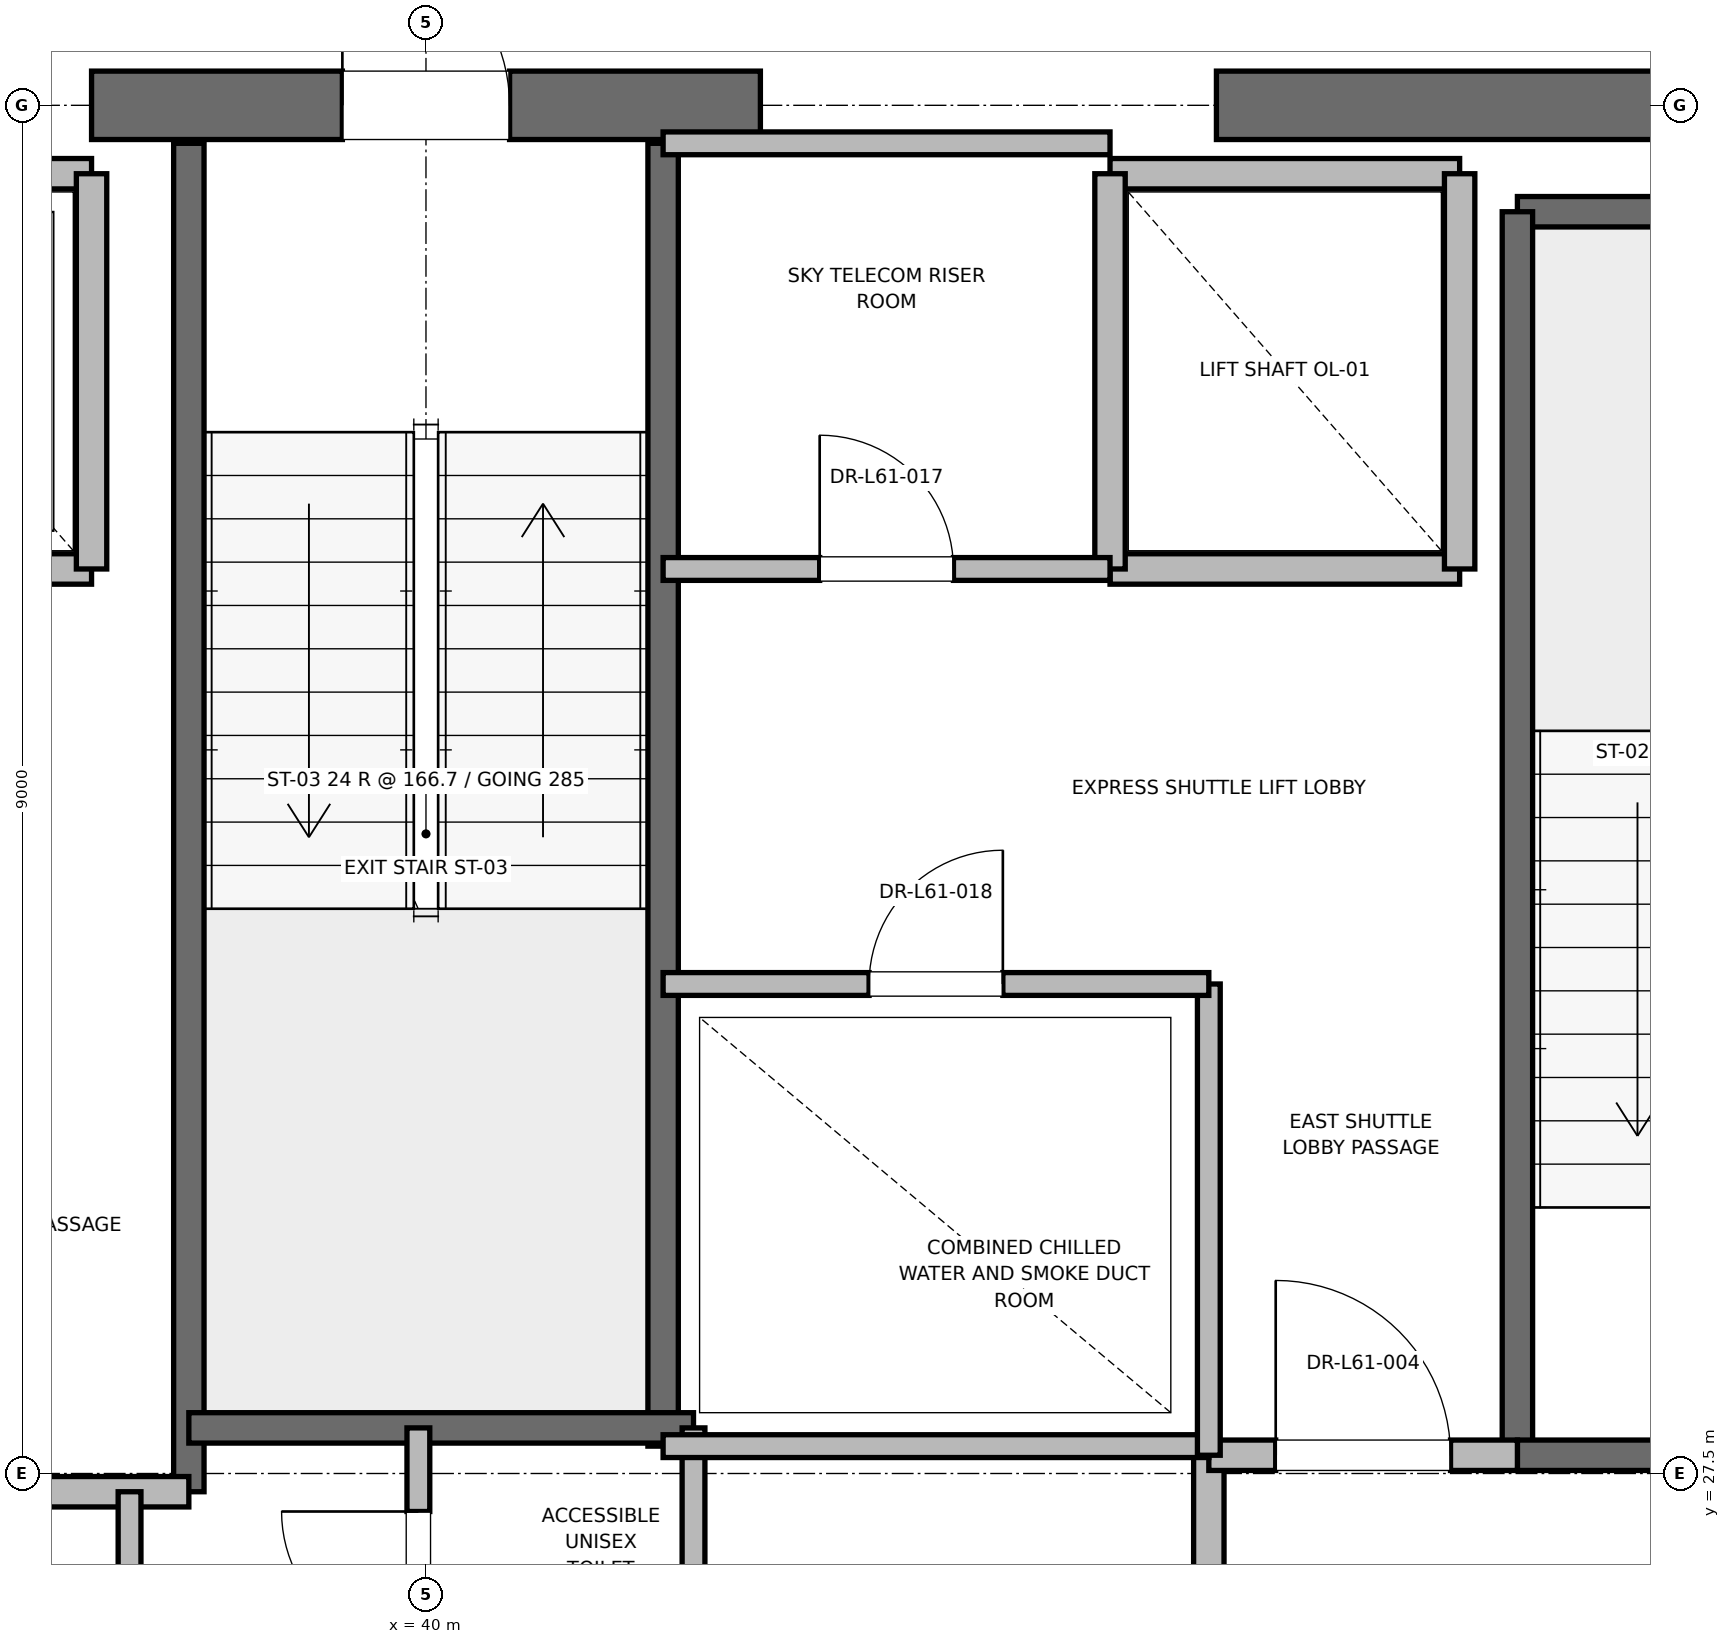
"""IFC4 building model, lengths in metres.
Left out: names, types, materials, properties, quantities, classifications, styles, units other than length and angle.
Written with IfcOpenShell. Run it as: python <this file> out.ifc"""

import sys

from ifc_helpers import new_model, si_unit, direction, frame, frame_2d, origin, place, context, subcontext, project, spatial, rectangle, extrude, element, fill, save


model = new_model("IFC4")
c1 = context("Model", 3, precision=1e-05, world=origin(), true_north=direction((0.0, 1.0)))
c2 = subcontext(c1, "Body", "Model", "MODEL_VIEW")
j1 = project(units=[si_unit("LENGTHUNIT", "METRE"), si_unit("PLANEANGLEUNIT", "RADIAN")], contexts=[c1])
p1 = place(None, origin())
s1 = spatial("IfcSite", under=j1, at=p1, CompositionType="ELEMENT")
p2 = place(p1, origin())
s2 = spatial("IfcBuilding", under=s1, at=p2, CompositionType="ELEMENT")
p3 = place(p2, frame((0.0, 0.0, 263.2)))
s3 = spatial("IfcBuildingStorey", under=s2, at=p3, CompositionType="ELEMENT", Elevation=263.2)
p4 = place(p3, frame((37.8, 36.5, 0.0), z_axis=(0.0, 0.0, 1.0), x_axis=(1.0, 0.0, 0.0)))
e1 = element("IfcWall", 1, at=p4, inside=s3, PredefinedType="SHEAR", context=c2, shape_type="SweptSolid", body=[
    extrude(rectangle(XDim=4.4, YDim=0.45, at=frame_2d((2.2, 0.0))), origin(), (0.0, 0.0, 1.0), 3.785),
])
p5 = place(p4, frame((1.65, 0.0, 0.0)))
e2 = element("IfcOpeningElement", 2, at=p5, cuts=e1, PredefinedType="OPENING", context=c2, shape_type="SweptSolid", body=[
    extrude(rectangle(XDim=1.1, YDim=2.15, at=frame_2d((0.55, 1.075))), frame((0.0, 0.225, 0.0), z_axis=(0.0, -1.0, 0.0), x_axis=(1.0, 0.0, 0.0)), (0.0, 0.0, 1.0), 0.45),
])
p6 = place(p3, frame((45.2, 36.5, 0.0), z_axis=(0.0, 0.0, 1.0), x_axis=(1.0, 0.0, 0.0)))
e3 = element("IfcWall", 3, at=p6, inside=s3, PredefinedType="SHEAR", context=c2, shape_type="SweptSolid", body=[
    extrude(rectangle(XDim=5.8, YDim=0.45, at=frame_2d((2.9, 0.0))), origin(), (0.0, 0.0, 1.0), 3.785),
])
p7 = place(p3, frame((47.18, 35.8, 0.0), z_axis=(0.0, 0.0, 1.0), x_axis=(1.0, 0.0, 0.0)))
e4 = element("IfcWall", 4, at=p7, inside=s3, PredefinedType="SOLIDWALL", context=c2, shape_type="SweptSolid", body=[
    extrude(rectangle(XDim=3.12, YDim=0.2, at=frame_2d((1.56, 0.0))), origin(), (0.0, 0.0, 1.0), 3.785),
])
p8 = place(p3, frame((47.18, 27.62, 0.0), z_axis=(0.0, 0.0, 1.0), x_axis=(0.0, 1.0, 0.0)))
e5 = element("IfcWall", 5, at=p8, inside=s3, PredefinedType="SOLIDWALL", context=c2, shape_type="SweptSolid", body=[
    extrude(rectangle(XDim=8.18, YDim=0.2, at=frame_2d((4.09, 0.0))), origin(), (0.0, 0.0, 1.0), 3.785),
])
p9 = place(p3, frame((47.18, 27.62, 0.0), z_axis=(0.0, 0.0, 1.0), x_axis=(1.0, 0.0, 0.0)))
e6 = element("IfcWall", 6, at=p9, inside=s3, PredefinedType="SOLIDWALL", context=c2, shape_type="SweptSolid", body=[
    extrude(rectangle(XDim=3.12, YDim=0.2, at=frame_2d((1.56, 0.0))), origin(), (0.0, 0.0, 1.0), 3.785),
])
p10 = place(p9, frame((1.01, 0.0, 0.0)))
e7 = element("IfcOpeningElement", 7, at=p10, cuts=e6, PredefinedType="OPENING", context=c2, shape_type="SweptSolid", body=[
    extrude(rectangle(XDim=1.1, YDim=2.15, at=frame_2d((0.55, 1.075))), frame((0.0, 0.1, 0.0), z_axis=(0.0, -1.0, 0.0), x_axis=(1.0, 0.0, 0.0)), (0.0, 0.0, 1.0), 0.2),
])
p11 = place(p3, frame((38.44, 27.38, 0.0), z_axis=(0.0, 0.0, 1.0), x_axis=(0.0, 1.0, 0.0)))
e8 = element("IfcWall", 8, at=p11, inside=s3, PredefinedType="SOLIDWALL", context=c2, shape_type="SweptSolid", body=[
    extrude(rectangle(XDim=8.87, YDim=0.2, at=frame_2d((4.435, 0.0))), origin(), (0.0, 0.0, 1.0), 3.785),
])
p12 = place(p3, frame((41.56, 27.68, 0.0), z_axis=(0.0, 0.0, 1.0), x_axis=(0.0, 1.0, 0.0)))
e9 = element("IfcWall", 9, at=p12, inside=s3, PredefinedType="SOLIDWALL", context=c2, shape_type="SweptSolid", body=[
    extrude(rectangle(XDim=8.57, YDim=0.2, at=frame_2d((4.285, 0.0))), origin(), (0.0, 0.0, 1.0), 3.785),
])
p13 = place(p3, frame((38.44, 27.8, 0.0), z_axis=(0.0, 0.0, 1.0), x_axis=(1.0, 0.0, 0.0)))
e10 = element("IfcWall", 10, at=p13, inside=s3, PredefinedType="SOLIDWALL", context=c2, shape_type="SweptSolid", body=[
    extrude(rectangle(XDim=3.32, YDim=0.2, at=frame_2d((1.66, 0.0))), origin(), (0.0, 0.0, 1.0), 3.785),
])
p14 = place(p3, frame((32.82, 27.38, 0.0), z_axis=(0.0, 0.0, 1.0), x_axis=(1.0, 0.0, 0.0)))
e11 = element("IfcWall", 11, at=p14, inside=s3, PredefinedType="PARTITIONING", context=c2, shape_type="SweptSolid", body=[
    extrude(rectangle(XDim=5.62, YDim=0.2, at=frame_2d((2.81, 0.0))), origin(), (0.0, 0.0, 1.0), 3.785),
])
p15 = place(p3, frame((45.15, 24.25, 0.0), z_axis=(0.0, 0.0, 1.0), x_axis=(0.0, 1.0, 0.0)))
e12 = element("IfcWall", 12, at=p15, inside=s3, PredefinedType="PARTITIONING", context=c2, shape_type="SweptSolid", body=[
    extrude(rectangle(XDim=3.37, YDim=0.2, at=frame_2d((1.685, 0.0))), origin(), (0.0, 0.0, 1.0), 3.785),
])
p16 = place(p3, frame((45.15, 27.62, 0.0), z_axis=(0.0, 0.0, 1.0), x_axis=(1.0, 0.0, 0.0)))
e13 = element("IfcWall", 13, at=p16, inside=s3, PredefinedType="PARTITIONING", context=c2, shape_type="SweptSolid", body=[
    extrude(rectangle(XDim=2.03, YDim=0.2, at=frame_2d((1.015, 0.0))), origin(), (0.0, 0.0, 1.0), 3.785),
])
p17 = place(p16, frame((0.44, 0.0, 0.0)))
e14 = element("IfcOpeningElement", 14, at=p17, cuts=e13, PredefinedType="OPENING", context=c2, shape_type="SweptSolid", body=[
    extrude(rectangle(XDim=1.15, YDim=2.2, at=frame_2d((0.575, 1.1))), frame((0.0, 0.1, 0.0), z_axis=(0.0, -1.0, 0.0), x_axis=(1.0, 0.0, 0.0)), (0.0, 0.0, 1.0), 0.2),
])
p18 = place(p3, frame((35.5, 33.45, 0.0), z_axis=(0.0, 0.0, 1.0), x_axis=(1.0, 0.0, 0.0)))
e15 = element("IfcWall", 15, at=p18, inside=s3, PredefinedType="SOLIDWALL", context=c2, shape_type="SweptSolid", body=[
    extrude(rectangle(XDim=2.3, YDim=0.2, at=frame_2d((1.15, 0.0))), origin(), (0.0, 0.0, 1.0), 3.785),
])
p19 = place(p18, frame((0.6, 0.0, 0.0)))
e16 = element("IfcOpeningElement", 16, at=p19, cuts=e15, PredefinedType="OPENING", context=c2, shape_type="SweptSolid", body=[
    extrude(rectangle(XDim=1.1, YDim=2.2, at=frame_2d((0.55, 1.1))), frame((0.0, 0.1, 0.0), z_axis=(0.0, -1.0, 0.0), x_axis=(1.0, 0.0, 0.0)), (0.0, 0.0, 1.0), 0.2),
])
p20 = place(p3, frame((37.8, 36.05, 0.0), z_axis=(0.0, 0.0, 1.0), x_axis=(-1.0, 0.0, 0.0)))
e17 = element("IfcWall", 17, at=p20, inside=s3, PredefinedType="SOLIDWALL", context=c2, shape_type="SweptSolid", body=[
    extrude(rectangle(XDim=2.3, YDim=0.2, at=frame_2d((1.15, 0.0))), origin(), (0.0, 0.0, 1.0), 2.865),
])
p21 = place(p3, frame((37.8, 33.45, 0.0), z_axis=(0.0, 0.0, 1.0), x_axis=(0.0, 1.0, 0.0)))
e18 = element("IfcWall", 18, at=p21, inside=s3, PredefinedType="SOLIDWALL", context=c2, shape_type="SweptSolid", body=[
    extrude(rectangle(XDim=2.6, YDim=0.2, at=frame_2d((1.3, 0.0))), origin(), (0.0, 0.0, 1.0), 2.865),
])
p22 = place(p3, frame((44.5, 33.45, 0.0), z_axis=(0.0, 0.0, 1.0), x_axis=(1.0, 0.0, 0.0)))
e19 = element("IfcWall", 19, at=p22, inside=s3, PredefinedType="SOLIDWALL", context=c2, shape_type="SweptSolid", body=[
    extrude(rectangle(XDim=2.3, YDim=0.2, at=frame_2d((1.15, 0.0))), origin(), (0.0, 0.0, 1.0), 3.785),
])
p23 = place(p3, frame((46.8, 36.05, 0.0), z_axis=(0.0, 0.0, 1.0), x_axis=(-1.0, 0.0, 0.0)))
e20 = element("IfcWall", 20, at=p23, inside=s3, PredefinedType="SOLIDWALL", context=c2, shape_type="SweptSolid", body=[
    extrude(rectangle(XDim=2.3, YDim=0.2, at=frame_2d((1.15, 0.0))), origin(), (0.0, 0.0, 1.0), 2.865),
])
p24 = place(p3, frame((44.5, 36.05, 0.0), z_axis=(0.0, 0.0, 1.0), x_axis=(0.0, -1.0, 0.0)))
e21 = element("IfcWall", 21, at=p24, inside=s3, PredefinedType="SOLIDWALL", context=c2, shape_type="SweptSolid", body=[
    extrude(rectangle(XDim=2.6, YDim=0.2, at=frame_2d((1.3, 0.0))), origin(), (0.0, 0.0, 1.0), 2.865),
])
p25 = place(p3, frame((46.8, 33.45, 0.0), z_axis=(0.0, 0.0, 1.0), x_axis=(0.0, 1.0, 0.0)))
e22 = element("IfcWall", 22, at=p25, inside=s3, PredefinedType="SOLIDWALL", context=c2, shape_type="SweptSolid", body=[
    extrude(rectangle(XDim=2.6, YDim=0.2, at=frame_2d((1.3, 0.0))), origin(), (0.0, 0.0, 1.0), 3.785),
])
p26 = place(p3, frame((41.76, 23.8, 0.0), z_axis=(0.0, 0.0, 1.0), x_axis=(0.0, 1.0, 0.0)))
e23 = element("IfcWall", 23, at=p26, inside=s3, PredefinedType="PARTITIONING", context=c2, shape_type="SweptSolid", body=[
    extrude(rectangle(XDim=4.0, YDim=0.15, at=frame_2d((2.0, 0.0))), origin(), (0.0, 0.0, 1.0), 2.85),
])
p27 = place(p3, frame((39.95, 25.8, 0.0), z_axis=(0.0, 0.0, 1.0), x_axis=(0.0, 1.0, 0.0)))
e24 = element("IfcWall", 24, at=p27, inside=s3, PredefinedType="PARTITIONING", context=c2, shape_type="SweptSolid", body=[
    extrude(rectangle(XDim=2.0, YDim=0.15, at=frame_2d((1.0, 0.0))), origin(), (0.0, 0.0, 1.0), 2.85),
])
p28 = place(p27, frame((0.55, 0.0, 0.0)))
e25 = element("IfcOpeningElement", 25, at=p28, cuts=e24, PredefinedType="OPENING", context=c2, shape_type="SweptSolid", body=[
    extrude(rectangle(XDim=0.9, YDim=2.1, at=frame_2d((0.45, 1.05))), frame((0.0, 0.075, 0.0), z_axis=(0.0, -1.0, 0.0), x_axis=(1.0, 0.0, 0.0)), (0.0, 0.0, 1.0), 0.15),
])
p29 = place(p3, frame((38.05, 18.6, 0.0), z_axis=(0.0, 0.0, 1.0), x_axis=(0.0, 1.0, 0.0)))
e26 = element("IfcWall", 26, at=p29, inside=s3, PredefinedType="PARTITIONING", context=c2, shape_type="SweptSolid", body=[
    extrude(rectangle(XDim=8.78, YDim=0.15, at=frame_2d((4.39, 0.0))), origin(), (0.0, 0.0, 1.0), 2.85),
])
p30 = place(p29, frame((3.89, 0.0, 0.0)))
e27 = element("IfcOpeningElement", 27, at=p30, cuts=e26, PredefinedType="OPENING", context=c2, shape_type="SweptSolid", body=[
    extrude(rectangle(XDim=1.0, YDim=2.15, at=frame_2d((0.5, 1.075))), frame((0.0, 0.075, 0.0), z_axis=(0.0, -1.0, 0.0), x_axis=(1.0, 0.0, 0.0)), (0.0, 0.0, 1.0), 0.15),
])
p31 = place(p3, frame((41.56, 27.68, 0.0), z_axis=(0.0, 0.0, 1.0), x_axis=(1.0, 0.0, 0.0)))
e28 = element("IfcWall", 28, at=p31, inside=s3, PredefinedType="PARTITIONING", context=c2, shape_type="SweptSolid", body=[
    extrude(rectangle(XDim=3.59, YDim=0.15, at=frame_2d((1.795, 0.0))), origin(), (0.0, 0.0, 1.0), 2.85),
])
p32 = place(p3, frame((45.15, 27.62, 0.0), z_axis=(0.0, 0.0, 1.0), x_axis=(0.0, 1.0, 0.0)))
e29 = element("IfcWall", 29, at=p32, inside=s3, PredefinedType="PARTITIONING", context=c2, shape_type="SweptSolid", body=[
    extrude(rectangle(XDim=3.1, YDim=0.15, at=frame_2d((1.55, 0.0))), origin(), (0.0, 0.0, 1.0), 2.85),
])
p33 = place(p3, frame((41.56, 30.72, 0.0), z_axis=(0.0, 0.0, 1.0), x_axis=(1.0, 0.0, 0.0)))
e30 = element("IfcWall", 30, at=p33, inside=s3, PredefinedType="PARTITIONING", context=c2, shape_type="SweptSolid", body=[
    extrude(rectangle(XDim=3.59, YDim=0.15, at=frame_2d((1.795, 0.0))), origin(), (0.0, 0.0, 1.0), 2.85),
])
p34 = place(p33, frame((1.355, 0.0, 0.0)))
e31 = element("IfcOpeningElement", 31, at=p34, cuts=e30, PredefinedType="OPENING", context=c2, shape_type="SweptSolid", body=[
    extrude(rectangle(XDim=0.88, YDim=2.1, at=frame_2d((0.44, 1.05))), frame((0.0, 0.075, 0.0), z_axis=(0.0, -1.0, 0.0), x_axis=(1.0, 0.0, 0.0)), (0.0, 0.0, 1.0), 0.15),
])
p35 = place(p3, frame((41.56, 36.25, 0.0), z_axis=(0.0, 0.0, 1.0), x_axis=(1.0, 0.0, 0.0)))
e32 = element("IfcWall", 32, at=p35, inside=s3, PredefinedType="PARTITIONING", context=c2, shape_type="SweptSolid", body=[
    extrude(rectangle(XDim=2.94, YDim=0.15, at=frame_2d((1.47, 0.0))), origin(), (0.0, 0.0, 1.0), 2.85),
])
p36 = place(p3, frame((41.56, 33.45, 0.0), z_axis=(0.0, 0.0, 1.0), x_axis=(1.0, 0.0, 0.0)))
e33 = element("IfcWall", 33, at=p36, inside=s3, PredefinedType="PARTITIONING", context=c2, shape_type="SweptSolid", body=[
    extrude(rectangle(XDim=2.94, YDim=0.15, at=frame_2d((1.47, 0.0))), origin(), (0.0, 0.0, 1.0), 2.85),
])
p37 = place(p36, frame((1.03, 0.0, 0.0)))
e34 = element("IfcOpeningElement", 34, at=p37, cuts=e33, PredefinedType="OPENING", context=c2, shape_type="SweptSolid", body=[
    extrude(rectangle(XDim=0.88, YDim=2.1, at=frame_2d((0.44, 1.05))), frame((0.0, 0.075, 0.0), z_axis=(0.0, -1.0, 0.0), x_axis=(1.0, 0.0, 0.0)), (0.0, 0.0, 1.0), 0.15),
])
p38 = place(p5, origin())
e35 = element("IfcDoor", 35, at=p38, inside=s3, OperationType="SINGLE_SWING_LEFT", PredefinedType="DOOR", context=c2, shape_type="SweptSolid", body=[
    extrude(rectangle(XDim=1.1, YDim=2.15, at=frame_2d((0.55, 1.075))), frame((0.0, 0.025, 0.0), z_axis=(0.0, -1.0, 0.0), x_axis=(1.0, 0.0, 0.0)), (0.0, 0.0, 1.0), 0.05),
])
fill(e2, e35)
p39 = place(p17, origin())
e36 = element("IfcDoor", 36, at=p39, inside=s3, OperationType="SINGLE_SWING_LEFT", PredefinedType="DOOR", context=c2, shape_type="SweptSolid", body=[
    extrude(rectangle(XDim=1.15, YDim=2.2, at=frame_2d((0.575, 1.1))), frame((0.0, 0.025, 0.0), z_axis=(0.0, -1.0, 0.0), x_axis=(1.0, 0.0, 0.0)), (0.0, 0.0, 1.0), 0.05),
])
fill(e14, e36)
p40 = place(p28, origin())
e37 = element("IfcDoor", 37, at=p40, inside=s3, OperationType="SINGLE_SWING_RIGHT", PredefinedType="DOOR", context=c2, shape_type="SweptSolid", body=[
    extrude(rectangle(XDim=0.9, YDim=2.1, at=frame_2d((0.45, 1.05))), frame((0.0, 0.025, 0.0), z_axis=(0.0, -1.0, 0.0), x_axis=(1.0, 0.0, 0.0)), (0.0, 0.0, 1.0), 0.05),
])
fill(e25, e37)
p41 = place(p34, origin())
e38 = element("IfcDoor", 38, at=p41, inside=s3, OperationType="SINGLE_SWING_RIGHT", PredefinedType="DOOR", context=c2, shape_type="SweptSolid", body=[
    extrude(rectangle(XDim=0.88, YDim=2.1, at=frame_2d((0.44, 1.05))), frame((0.0, 0.025, 0.0), z_axis=(0.0, -1.0, 0.0), x_axis=(1.0, 0.0, 0.0)), (0.0, 0.0, 1.0), 0.05),
])
fill(e31, e38)
p42 = place(p37, origin())
e39 = element("IfcDoor", 39, at=p42, inside=s3, OperationType="SINGLE_SWING_LEFT", PredefinedType="DOOR", context=c2, shape_type="SweptSolid", body=[
    extrude(rectangle(XDim=0.88, YDim=2.1, at=frame_2d((0.44, 1.05))), frame((0.0, 0.025, 0.0), z_axis=(0.0, -1.0, 0.0), x_axis=(1.0, 0.0, 0.0)), (0.0, 0.0, 1.0), 0.05),
])
fill(e34, e39)
save(model, sys.argv[1])
